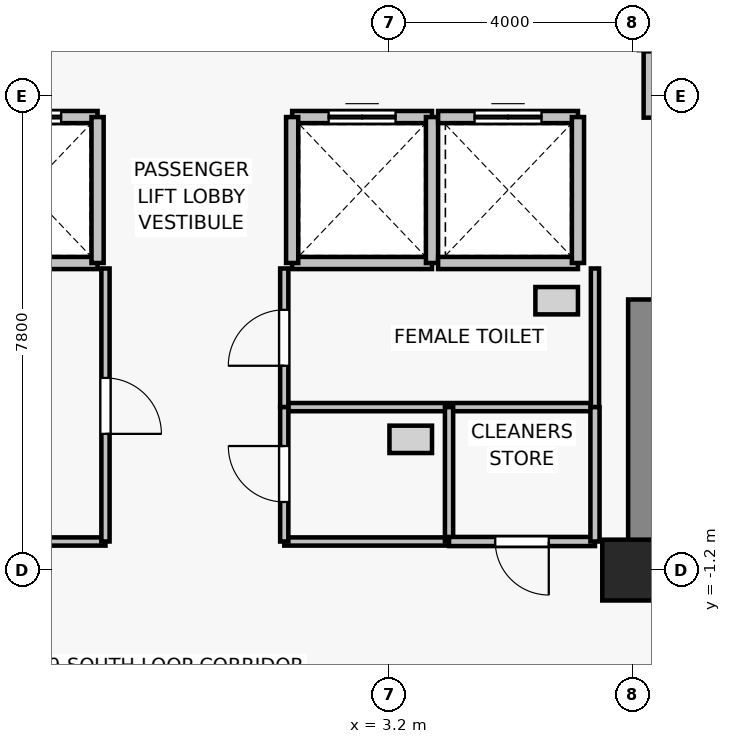
"""IFC4 building model, lengths in metres.
Left out: names, types, materials, properties, quantities, classifications, styles, units other than length and angle.
Written with IfcOpenShell. Run it as: python <this file> out.ifc"""

import sys

from ifc_helpers import new_model, si_unit, direction, frame, frame_2d, origin, origin_2d, place, context, subcontext, project, spatial, rectangle, extrude, source, transform, mapped, element, fill, save


model = new_model("IFC4")
c1 = context("Model", 3, precision=1e-05, world=origin(), true_north=direction((0.0, 1.0)))
c2 = subcontext(c1, "Body", "Model", "MODEL_VIEW")
j1 = project(units=[si_unit("LENGTHUNIT", "METRE"), si_unit("PLANEANGLEUNIT", "RADIAN")], contexts=[c1])
p1 = place(None, origin())
s1 = spatial("IfcSite", under=j1, at=p1, CompositionType="ELEMENT")
p2 = place(p1, origin())
s2 = spatial("IfcBuilding", under=s1, at=p2, CompositionType="ELEMENT")
p3 = place(p2, frame((0.0, 0.0, 106.6)))
s3 = spatial("IfcBuildingStorey", under=s2, at=p3, CompositionType="ELEMENT", Elevation=106.6)
p4 = place(p3, frame((7.2, -1.2, 0.0), z_axis=(0.0, 0.0, 1.0), x_axis=(1.0, 0.0, 0.0)))
e1 = element("IfcColumn", 1, at=p4, inside=s3, PredefinedType="COLUMN", context=c2, shape_type="SweptSolid", body=[
    extrude(rectangle(XDim=1.0, YDim=1.0, at=origin_2d()), origin(), (0.0, 0.0, 1.0), 3.3),
])
p5 = place(p3, frame((7.4, -0.825, 0.0), z_axis=(0.0, 0.0, 1.0), x_axis=(0.0, 1.0, 0.0)))
e2 = element("IfcWall", 2, at=p5, inside=s3, PredefinedType="SHEAR", context=c2, shape_type="SweptSolid", body=[
    extrude(rectangle(XDim=4.075, YDim=0.55, at=frame_2d((2.038, 0.0))), origin(), (0.0, 0.0, 1.0), 3.075),
])
p6 = place(p3, frame((-1.6, 3.85, 0.0), z_axis=(0.0, 0.0, 1.0), x_axis=(-1.0, 0.0, 0.0)))
e3 = element("IfcWall", 3, at=p6, inside=s3, PredefinedType="SOLIDWALL", context=c2, shape_type="SweptSolid", body=[
    extrude(rectangle(XDim=2.3, YDim=0.2, at=frame_2d((1.15, 0.0))), origin(), (0.0, 0.0, 1.0), 3.075),
])
p7 = place(p3, frame((-3.9, 6.25, 0.0), z_axis=(0.0, 0.0, 1.0), x_axis=(1.0, 0.0, 0.0)))
e4 = element("IfcWall", 4, at=p7, inside=s3, PredefinedType="SOLIDWALL", context=c2, shape_type="SweptSolid", body=[
    extrude(rectangle(XDim=2.3, YDim=0.2, at=frame_2d((1.15, 0.0))), origin(), (0.0, 0.0, 1.0), 3.075),
])
p8 = place(p7, frame((0.6, 0.0, 0.0)))
e5 = element("IfcOpeningElement", 5, at=p8, cuts=e4, PredefinedType="OPENING", context=c2, shape_type="SweptSolid", body=[
    extrude(rectangle(XDim=1.1, YDim=2.2, at=frame_2d((0.55, 1.1))), frame((0.0, 0.11, 0.0), z_axis=(0.0, -1.0, 0.0), x_axis=(1.0, 0.0, 0.0)), (0.0, 0.0, 1.0), 0.22),
])
p9 = place(p3, frame((-1.6, 6.25, 0.0), z_axis=(0.0, 0.0, 1.0), x_axis=(0.0, -1.0, 0.0)))
e6 = element("IfcWall", 6, at=p9, inside=s3, PredefinedType="SOLIDWALL", context=c2, shape_type="SweptSolid", body=[
    extrude(rectangle(XDim=2.4, YDim=0.2, at=frame_2d((1.2, 0.0))), origin(), (0.0, 0.0, 1.0), 3.075),
])
p10 = place(p3, frame((3.9, 3.85, 0.0), z_axis=(0.0, 0.0, 1.0), x_axis=(-1.0, 0.0, 0.0)))
e7 = element("IfcWall", 7, at=p10, inside=s3, PredefinedType="SOLIDWALL", context=c2, shape_type="SweptSolid", body=[
    extrude(rectangle(XDim=2.3, YDim=0.2, at=frame_2d((1.15, 0.0))), origin(), (0.0, 0.0, 1.0), 3.075),
])
p11 = place(p3, frame((1.6, 6.25, 0.0), z_axis=(0.0, 0.0, 1.0), x_axis=(1.0, 0.0, 0.0)))
e8 = element("IfcWall", 8, at=p11, inside=s3, PredefinedType="SOLIDWALL", context=c2, shape_type="SweptSolid", body=[
    extrude(rectangle(XDim=2.3, YDim=0.2, at=frame_2d((1.15, 0.0))), origin(), (0.0, 0.0, 1.0), 3.075),
])
p12 = place(p11, frame((0.6, 0.0, 0.0)))
e9 = element("IfcOpeningElement", 9, at=p12, cuts=e8, PredefinedType="OPENING", context=c2, shape_type="SweptSolid", body=[
    extrude(rectangle(XDim=1.1, YDim=2.2, at=frame_2d((0.55, 1.1))), frame((0.0, 0.11, 0.0), z_axis=(0.0, -1.0, 0.0), x_axis=(1.0, 0.0, 0.0)), (0.0, 0.0, 1.0), 0.22),
])
for number, where, z_axis, x_axis in (
    (10, (1.6, 3.85, 0.0), (0.0, 0.0, 1.0), (0.0, 1.0, 0.0)),
    (11, (3.9, 6.25, 0.0), (0.0, 0.0, 1.0), (0.0, -1.0, 0.0)),
):
    element("IfcWall", number, at=place(p3, frame(where, z_axis=z_axis, x_axis=x_axis)), inside=s3, PredefinedType="SOLIDWALL", context=c2, shape_type="SweptSolid", body=[
        extrude(rectangle(XDim=2.4, YDim=0.2, at=frame_2d((1.2, 0.0))), origin(), (0.0, 0.0, 1.0), 3.075),
    ])
p13 = place(p3, frame((6.3, 3.85, 0.0), z_axis=(0.0, 0.0, 1.0), x_axis=(-1.0, 0.0, 0.0)))
e12 = element("IfcWall", 12, at=p13, inside=s3, PredefinedType="SOLIDWALL", context=c2, shape_type="SweptSolid", body=[
    extrude(rectangle(XDim=2.3, YDim=0.2, at=frame_2d((1.15, 0.0))), origin(), (0.0, 0.0, 1.0), 3.075),
])
p14 = place(p3, frame((4.0, 6.25, 0.0), z_axis=(0.0, 0.0, 1.0), x_axis=(1.0, 0.0, 0.0)))
e13 = element("IfcWall", 13, at=p14, inside=s3, PredefinedType="SOLIDWALL", context=c2, shape_type="SweptSolid", body=[
    extrude(rectangle(XDim=2.3, YDim=0.2, at=frame_2d((1.15, 0.0))), origin(), (0.0, 0.0, 1.0), 3.075),
])
p15 = place(p14, frame((0.6, 0.0, 0.0)))
e14 = element("IfcOpeningElement", 14, at=p15, cuts=e13, PredefinedType="OPENING", context=c2, shape_type="SweptSolid", body=[
    extrude(rectangle(XDim=1.1, YDim=2.2, at=frame_2d((0.55, 1.1))), frame((0.0, 0.11, 0.0), z_axis=(0.0, -1.0, 0.0), x_axis=(1.0, 0.0, 0.0)), (0.0, 0.0, 1.0), 0.22),
])
p16 = place(p3, frame((6.3, 6.25, 0.0), z_axis=(0.0, 0.0, 1.0), x_axis=(0.0, -1.0, 0.0)))
e15 = element("IfcWall", 15, at=p16, inside=s3, PredefinedType="SOLIDWALL", context=c2, shape_type="SweptSolid", body=[
    extrude(rectangle(XDim=2.4, YDim=0.2, at=frame_2d((1.2, 0.0))), origin(), (0.0, 0.0, 1.0), 3.075),
])
p17 = place(p3, frame((9.6, 7.35, 0.0), z_axis=(0.0, 0.0, 1.0), x_axis=(-1.0, 0.0, 0.0)))
e16 = element("IfcWall", 16, at=p17, inside=s3, PredefinedType="SOLIDWALL", context=c2, shape_type="SweptSolid", body=[
    extrude(rectangle(XDim=2.2, YDim=0.2, at=frame_2d((1.1, 0.0))), origin(), (0.0, 0.0, 1.0), 2.515),
])
p18 = place(p3, frame((7.47, 6.24, 0.0), z_axis=(0.0, 0.0, 1.0), x_axis=(0.0, 1.0, 0.0)))
e17 = element("IfcWall", 17, at=p18, inside=s3, PredefinedType="PARTITIONING", context=c2, shape_type="SweptSolid", body=[
    extrude(rectangle(XDim=1.09, YDim=0.18, at=frame_2d((0.545, 0.0))), origin(), (0.0, 0.0, 1.0), 2.515),
])
p19 = place(p3, frame((-1.47, -0.73, 0.0), z_axis=(0.0, 0.0, 1.0), x_axis=(-1.0, 0.0, 0.0)))
e18 = element("IfcWall", 18, at=p19, inside=s3, PredefinedType="PARTITIONING", context=c2, shape_type="SweptSolid", body=[
    extrude(rectangle(XDim=5.11, YDim=0.135, at=frame_2d((2.555, 0.0))), origin(), (0.0, 0.0, 1.0), 3.075),
])
p20 = place(p3, frame((-1.47, 3.76, 0.0), z_axis=(0.0, 0.0, 1.0), x_axis=(0.0, -1.0, 0.0)))
e19 = element("IfcWall", 19, at=p20, inside=s3, PredefinedType="PARTITIONING", context=c2, shape_type="SweptSolid", body=[
    extrude(rectangle(XDim=4.49, YDim=0.135, at=frame_2d((2.245, 0.0))), origin(), (0.0, 0.0, 1.0), 3.075),
])
p21 = place(p20, frame((1.8, 0.0, 0.0)))
e20 = element("IfcOpeningElement", 20, at=p21, cuts=e19, PredefinedType="OPENING", context=c2, shape_type="SweptSolid", body=[
    extrude(rectangle(XDim=0.92, YDim=2.1, at=frame_2d((0.46, 1.05))), frame((0.0, 0.077, 0.0), z_axis=(0.0, -1.0, 0.0), x_axis=(1.0, 0.0, 0.0)), (0.0, 0.0, 1.0), 0.155),
])
p22 = place(p3, frame((6.58, 1.48, 0.0), z_axis=(0.0, 0.0, 1.0), x_axis=(-1.0, 0.0, 0.0)))
e21 = element("IfcWall", 21, at=p22, inside=s3, PredefinedType="PARTITIONING", context=c2, shape_type="SweptSolid", body=[
    extrude(rectangle(XDim=5.11, YDim=0.135, at=frame_2d((2.555, 0.0))), origin(), (0.0, 0.0, 1.0), 3.075),
])
p23 = place(p3, frame((1.47, 1.48, 0.0), z_axis=(0.0, 0.0, 1.0), x_axis=(0.0, 1.0, 0.0)))
e22 = element("IfcWall", 22, at=p23, inside=s3, PredefinedType="PARTITIONING", context=c2, shape_type="SweptSolid", body=[
    extrude(rectangle(XDim=2.28, YDim=0.135, at=frame_2d((1.14, 0.0))), origin(), (0.0, 0.0, 1.0), 3.075),
])
p24 = place(p23, frame((0.68, 0.0, 0.0)))
e23 = element("IfcOpeningElement", 23, at=p24, cuts=e22, PredefinedType="OPENING", context=c2, shape_type="SweptSolid", body=[
    extrude(rectangle(XDim=0.92, YDim=2.1, at=frame_2d((0.46, 1.05))), frame((0.0, 0.077, 0.0), z_axis=(0.0, -1.0, 0.0), x_axis=(1.0, 0.0, 0.0)), (0.0, 0.0, 1.0), 0.155),
])
p25 = place(p3, frame((6.58, 3.76, 0.0), z_axis=(0.0, 0.0, 1.0), x_axis=(0.0, -1.0, 0.0)))
e24 = element("IfcWall", 24, at=p25, inside=s3, PredefinedType="PARTITIONING", context=c2, shape_type="SweptSolid", body=[
    extrude(rectangle(XDim=2.28, YDim=0.135, at=frame_2d((1.14, 0.0))), origin(), (0.0, 0.0, 1.0), 3.075),
])
p26 = place(p3, frame((4.18, -0.73, 0.0), z_axis=(0.0, 0.0, 1.0), x_axis=(-1.0, 0.0, 0.0)))
e25 = element("IfcWall", 25, at=p26, inside=s3, PredefinedType="PARTITIONING", context=c2, shape_type="SweptSolid", body=[
    extrude(rectangle(XDim=2.71, YDim=0.135, at=frame_2d((1.355, 0.0))), origin(), (0.0, 0.0, 1.0), 3.075),
])
p27 = place(p3, frame((1.47, -0.73, 0.0), z_axis=(0.0, 0.0, 1.0), x_axis=(0.0, 1.0, 0.0)))
e26 = element("IfcWall", 26, at=p27, inside=s3, PredefinedType="PARTITIONING", context=c2, shape_type="SweptSolid", body=[
    extrude(rectangle(XDim=2.21, YDim=0.135, at=frame_2d((1.105, 0.0))), origin(), (0.0, 0.0, 1.0), 3.075),
])
p28 = place(p27, frame((0.65, 0.0, 0.0)))
e27 = element("IfcOpeningElement", 27, at=p28, cuts=e26, PredefinedType="OPENING", context=c2, shape_type="SweptSolid", body=[
    extrude(rectangle(XDim=0.92, YDim=2.1, at=frame_2d((0.46, 1.05))), frame((0.0, 0.077, 0.0), z_axis=(0.0, -1.0, 0.0), x_axis=(1.0, 0.0, 0.0)), (0.0, 0.0, 1.0), 0.155),
])
p29 = place(p3, frame((4.18, 1.48, 0.0), z_axis=(0.0, 0.0, 1.0), x_axis=(0.0, -1.0, 0.0)))
e28 = element("IfcWall", 28, at=p29, inside=s3, PredefinedType="PARTITIONING", context=c2, shape_type="SweptSolid", body=[
    extrude(rectangle(XDim=2.21, YDim=0.135, at=frame_2d((1.105, 0.0))), origin(), (0.0, 0.0, 1.0), 3.075),
])
p30 = place(p3, frame((6.58, -0.73, 0.0), z_axis=(0.0, 0.0, 1.0), x_axis=(-1.0, 0.0, 0.0)))
e29 = element("IfcWall", 29, at=p30, inside=s3, PredefinedType="PARTITIONING", context=c2, shape_type="SweptSolid", body=[
    extrude(rectangle(XDim=2.4, YDim=0.15, at=frame_2d((1.2, 0.0))), origin(), (0.0, 0.0, 1.0), 3.075),
])
p31 = place(p30, frame((0.76, 0.0, 0.0)))
e30 = element("IfcOpeningElement", 30, at=p31, cuts=e29, PredefinedType="OPENING", context=c2, shape_type="SweptSolid", body=[
    extrude(rectangle(XDim=0.88, YDim=2.1, at=frame_2d((0.44, 1.05))), frame((0.0, 0.085, 0.0), z_axis=(0.0, -1.0, 0.0), x_axis=(1.0, 0.0, 0.0)), (0.0, 0.0, 1.0), 0.17),
])
p32 = place(p3, frame((6.58, 1.48, 0.0), z_axis=(0.0, 0.0, 1.0), x_axis=(0.0, -1.0, 0.0)))
e31 = element("IfcWall", 31, at=p32, inside=s3, PredefinedType="PARTITIONING", context=c2, shape_type="SweptSolid", body=[
    extrude(rectangle(XDim=2.21, YDim=0.15, at=frame_2d((1.105, 0.0))), origin(), (0.0, 0.0, 1.0), 3.075),
])
m1 = source(origin(), c2, "Body", "SweptSolid", [
    extrude(rectangle(XDim=1.1, YDim=2.2, at=frame_2d((0.55, 1.1))), frame((0.0, 0.025, 0.0), z_axis=(0.0, -1.0, 0.0), x_axis=(1.0, 0.0, 0.0)), (0.0, 0.0, 1.0), 0.05),
])
p33 = place(p8, origin())
e32 = element("IfcDoor", 32, at=p33, inside=s3, OperationType="DOUBLE_DOOR_SLIDING", PredefinedType="DOOR", context=c2, shape_type="MappedRepresentation", body=[
    mapped(m1, transform((0.0, 0.0, 0.0), x_axis=(1.0, 0.0, 0.0), y_axis=(0.0, 1.0, 0.0), z_axis=(0.0, 0.0, 1.0), scale=1.0)),
])
fill(e5, e32)
p34 = place(p12, origin())
e33 = element("IfcDoor", 33, at=p34, inside=s3, OperationType="DOUBLE_DOOR_SLIDING", PredefinedType="DOOR", context=c2, shape_type="MappedRepresentation", body=[
    mapped(m1, transform((0.0, 0.0, 0.0), x_axis=(1.0, 0.0, 0.0), y_axis=(0.0, 1.0, 0.0), z_axis=(0.0, 0.0, 1.0), scale=1.0)),
])
fill(e9, e33)
p35 = place(p15, origin())
e34 = element("IfcDoor", 34, at=p35, inside=s3, OperationType="DOUBLE_DOOR_SLIDING", PredefinedType="DOOR", context=c2, shape_type="MappedRepresentation", body=[
    mapped(m1, transform((0.0, 0.0, 0.0), x_axis=(1.0, 0.0, 0.0), y_axis=(0.0, 1.0, 0.0), z_axis=(0.0, 0.0, 1.0), scale=1.0)),
])
fill(e14, e34)
m2 = source(origin(), c2, "Body", "SweptSolid", [
    extrude(rectangle(XDim=0.92, YDim=2.1, at=frame_2d((0.46, 1.05))), frame((0.0, 0.025, 0.0), z_axis=(0.0, -1.0, 0.0), x_axis=(1.0, 0.0, 0.0)), (0.0, 0.0, 1.0), 0.05),
])
p36 = place(p21, origin())
e35 = element("IfcDoor", 35, at=p36, inside=s3, OperationType="SINGLE_SWING_RIGHT", PredefinedType="DOOR", context=c2, shape_type="MappedRepresentation", body=[
    mapped(m2, transform((0.0, 0.0, 0.0), x_axis=(1.0, 0.0, 0.0), y_axis=(0.0, 1.0, 0.0), z_axis=(0.0, 0.0, 1.0), scale=1.0)),
])
fill(e20, e35)
p37 = place(p24, origin())
e36 = element("IfcDoor", 36, at=p37, inside=s3, OperationType="SINGLE_SWING_LEFT", PredefinedType="DOOR", context=c2, shape_type="MappedRepresentation", body=[
    mapped(m2, transform((0.0, 0.0, 0.0), x_axis=(1.0, 0.0, 0.0), y_axis=(0.0, 1.0, 0.0), z_axis=(0.0, 0.0, 1.0), scale=1.0)),
])
fill(e23, e36)
p38 = place(p28, origin())
e37 = element("IfcDoor", 37, at=p38, inside=s3, OperationType="SINGLE_SWING_RIGHT", PredefinedType="DOOR", context=c2, shape_type="MappedRepresentation", body=[
    mapped(m2, transform((0.0, 0.0, 0.0), x_axis=(1.0, 0.0, 0.0), y_axis=(0.0, 1.0, 0.0), z_axis=(0.0, 0.0, 1.0), scale=1.0)),
])
fill(e27, e37)
m3 = source(origin(), c2, "Body", "SweptSolid", [
    extrude(rectangle(XDim=0.88, YDim=2.1, at=frame_2d((0.44, 1.05))), frame((0.0, 0.025, 0.0), z_axis=(0.0, -1.0, 0.0), x_axis=(1.0, 0.0, 0.0)), (0.0, 0.0, 1.0), 0.05),
])
p39 = place(p31, origin())
e38 = element("IfcDoor", 38, at=p39, inside=s3, OperationType="SINGLE_SWING_LEFT", PredefinedType="DOOR", context=c2, shape_type="MappedRepresentation", body=[
    mapped(m3, transform((0.0, 0.0, 0.0), x_axis=(1.0, 0.0, 0.0), y_axis=(0.0, 1.0, 0.0), z_axis=(0.0, 0.0, 1.0), scale=1.0)),
])
fill(e30, e38)
save(model, sys.argv[1])
